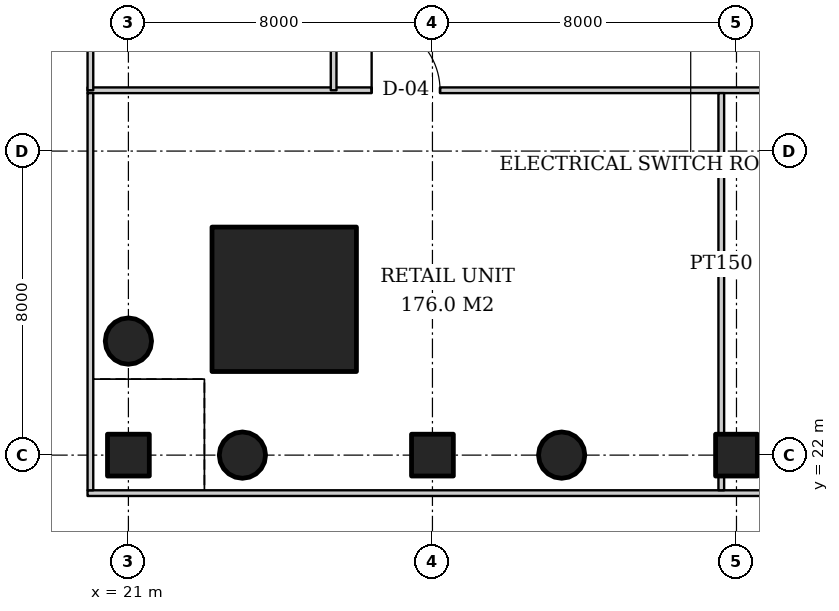
"""IFC4 building model, lengths in metres.
Left out: names, types, materials, properties, quantities, classifications, styles, units other than length and angle.
Written with IfcOpenShell. Run it as: python <this file> out.ifc"""

import sys

from ifc_helpers import new_model, si_unit, direction, frame, frame_2d, origin, origin_2d, place, context, subcontext, project, spatial, rectangle, hollow_circle, extrude, element, fill, save


model = new_model("IFC4")
c1 = context("Model", 3, precision=1e-05, world=origin(), true_north=direction((0.0, 1.0)))
c2 = subcontext(c1, "Body", "Model", "MODEL_VIEW")
j1 = project(units=[si_unit("LENGTHUNIT", "METRE"), si_unit("PLANEANGLEUNIT", "RADIAN")], contexts=[c1])
p1 = place(None, origin())
s1 = spatial("IfcSite", under=j1, at=p1, CompositionType="ELEMENT")
p2 = place(p1, origin())
s2 = spatial("IfcBuilding", under=s1, at=p2, CompositionType="ELEMENT")
p3 = place(p2, frame((0.0, 0.0, 6.0)))
s3 = spatial("IfcBuildingStorey", under=s2, at=p3, CompositionType="ELEMENT", Elevation=6.0)
p4 = place(p3, frame((25.1, 26.1, 0.0), z_axis=(0.0, 0.0, 1.0), x_axis=(1.0, 0.0, 0.0)))
e1 = element("IfcColumn", 1, at=p4, inside=s3, PredefinedType="COLUMN", context=c2, shape_type="SweptSolid", body=[
    extrude(rectangle(XDim=3.8, YDim=3.8, at=origin_2d()), origin(), (0.0, 0.0, 1.0), 5.0),
])
for number, where, z_axis, x_axis in (
    (2, (21.0, 25.0, 0.0), (0.0, 0.0, 1.0), (1.0, 0.0, 0.0)),
    (3, (24.0, 22.0, 0.0), (0.0, 0.0, 1.0), (1.0, 0.0, 0.0)),
    (4, (32.4, 22.0, 0.0), (0.0, 0.0, 1.0), (1.0, 0.0, 0.0)),
):
    element("IfcColumn", number, at=place(p3, frame(where, z_axis=z_axis, x_axis=x_axis)), inside=s3, PredefinedType="COLUMN", context=c2, shape_type="SweptSolid", body=[
        extrude(hollow_circle(Radius=0.61, WallThickness=0.04, at=origin_2d()), origin(), (0.0, 0.0, 1.0), 5.0),
    ])
for number, where, z_axis, x_axis in (
    (5, (21.0, 22.0, 0.0), (0.0, 0.0, 1.0), (1.0, 0.0, 0.0)),
    (6, (29.0, 22.0, 0.0), (0.0, 0.0, 1.0), (1.0, 0.0, 0.0)),
    (7, (37.0, 22.0, 0.0), (0.0, 0.0, 1.0), (1.0, 0.0, 0.0)),
):
    element("IfcColumn", number, at=place(p3, frame(where, z_axis=z_axis, x_axis=x_axis)), inside=s3, PredefinedType="COLUMN", context=c2, shape_type="SweptSolid", body=[
        extrude(rectangle(XDim=1.1, YDim=1.1, at=origin_2d()), origin(), (0.0, 0.0, 1.0), 5.0),
    ])
p5 = place(p3, frame((19.925, 21.0, 0.0), z_axis=(0.0, 0.0, 1.0), x_axis=(1.0, 0.0, 0.0)))
e8 = element("IfcWall", 8, at=p5, inside=s3, PredefinedType="PARTITIONING", context=c2, shape_type="SweptSolid", body=[
    extrude(rectangle(XDim=50.15, YDim=0.15, at=frame_2d((25.075, 0.0))), origin(), (0.0, 0.0, 1.0), 3.2),
])
p6 = place(p3, frame((19.925, 31.6, 0.0), z_axis=(0.0, 0.0, 1.0), x_axis=(1.0, 0.0, 0.0)))
e9 = element("IfcWall", 9, at=p6, inside=s3, PredefinedType="PARTITIONING", context=c2, shape_type="SweptSolid", body=[
    extrude(rectangle(XDim=50.15, YDim=0.15, at=frame_2d((25.075, 0.0))), origin(), (0.0, 0.0, 1.0), 3.688),
])
p7 = place(p6, frame((7.475, 0.0, 0.0)))
e10 = element("IfcOpeningElement", 10, at=p7, cuts=e9, PredefinedType="OPENING", context=c2, shape_type="SweptSolid", body=[
    extrude(rectangle(XDim=1.8, YDim=2.4, at=frame_2d((0.9, 1.2))), frame((0.0, 0.085, 0.0), z_axis=(0.0, -1.0, 0.0), x_axis=(1.0, 0.0, 0.0)), (0.0, 0.0, 1.0), 0.17),
])
p8 = place(p6, frame((19.975, 0.0, 0.0)))
e11 = element("IfcOpeningElement", 11, at=p8, cuts=e9, PredefinedType="OPENING", context=c2, shape_type="SweptSolid", body=[
    extrude(rectangle(XDim=1.8, YDim=2.4, at=frame_2d((0.9, 1.2))), frame((0.0, 0.085, 0.0), z_axis=(0.0, -1.0, 0.0), x_axis=(1.0, 0.0, 0.0)), (0.0, 0.0, 1.0), 0.17),
])
p9 = place(p6, frame((28.375, 0.0, 0.0)))
e12 = element("IfcOpeningElement", 12, at=p9, cuts=e9, PredefinedType="OPENING", context=c2, shape_type="SweptSolid", body=[
    extrude(rectangle(XDim=1.8, YDim=2.4, at=frame_2d((0.9, 1.2))), frame((0.0, 0.085, 0.0), z_axis=(0.0, -1.0, 0.0), x_axis=(1.0, 0.0, 0.0)), (0.0, 0.0, 1.0), 0.17),
])
p10 = place(p6, frame((40.875, 0.0, 0.0)))
e13 = element("IfcOpeningElement", 13, at=p10, cuts=e9, PredefinedType="OPENING", context=c2, shape_type="SweptSolid", body=[
    extrude(rectangle(XDim=1.8, YDim=2.4, at=frame_2d((0.9, 1.2))), frame((0.0, 0.085, 0.0), z_axis=(0.0, -1.0, 0.0), x_axis=(1.0, 0.0, 0.0)), (0.0, 0.0, 1.0), 0.17),
])
p11 = place(p3, frame((20.0, 21.075, 0.0), z_axis=(0.0, 0.0, 1.0), x_axis=(0.0, 1.0, 0.0)))
e14 = element("IfcWall", 14, at=p11, inside=s3, PredefinedType="PARTITIONING", context=c2, shape_type="SweptSolid", body=[
    extrude(rectangle(XDim=10.45, YDim=0.15, at=frame_2d((5.225, 0.0))), origin(), (0.0, 0.0, 1.0), 3.2),
])
p12 = place(p3, frame((36.6, 21.075, 0.0), z_axis=(0.0, 0.0, 1.0), x_axis=(0.0, 1.0, 0.0)))
e15 = element("IfcWall", 15, at=p12, inside=s3, PredefinedType="PARTITIONING", context=c2, shape_type="SweptSolid", body=[
    extrude(rectangle(XDim=0.375, YDim=0.15, at=frame_2d((0.188, 0.0))), origin(), (0.0, 0.0, 1.0), 3.2),
])
p13 = place(p3, frame((36.6, 22.55, 0.0), z_axis=(0.0, 0.0, 1.0), x_axis=(0.0, 1.0, 0.0)))
e16 = element("IfcWall", 16, at=p13, inside=s3, PredefinedType="PARTITIONING", context=c2, shape_type="SweptSolid", body=[
    extrude(rectangle(XDim=8.975, YDim=0.15, at=frame_2d((4.487, 0.0))), origin(), (0.0, 0.0, 1.0), 4.7),
])
p14 = place(p3, frame((20.0, 31.6, 0.0), z_axis=(0.0, 0.0, 1.0), x_axis=(0.0, 1.0, 0.0)))
e17 = element("IfcWall", 17, at=p14, inside=s3, PredefinedType="PARTITIONING", context=c2, shape_type="SweptSolid", body=[
    extrude(rectangle(XDim=28.8, YDim=0.15, at=frame_2d((14.4, 0.0))), origin(), (0.0, 0.0, 1.0), 3.2),
])
p15 = place(p3, frame((26.4, 31.6, 0.0), z_axis=(0.0, 0.0, 1.0), x_axis=(0.0, 1.0, 0.0)))
e18 = element("IfcWall", 18, at=p15, inside=s3, PredefinedType="PARTITIONING", context=c2, shape_type="SweptSolid", body=[
    extrude(rectangle(XDim=28.8, YDim=0.15, at=frame_2d((14.4, 0.0))), origin(), (0.0, 0.0, 1.0), 3.688),
])
p16 = place(p15, frame((6.45, 0.0, 0.0)))
e19 = element("IfcOpeningElement", 19, at=p16, cuts=e18, PredefinedType="OPENING", context=c2, shape_type="SweptSolid", body=[
    extrude(rectangle(XDim=1.5, YDim=2.1, at=frame_2d((0.75, 1.05))), frame((0.0, 0.085, 0.0), z_axis=(0.0, -1.0, 0.0), x_axis=(1.0, 0.0, 0.0)), (0.0, 0.0, 1.0), 0.17),
])
p17 = place(p15, frame((20.7, 0.0, 0.0)))
e20 = element("IfcOpeningElement", 20, at=p17, cuts=e18, PredefinedType="OPENING", context=c2, shape_type="SweptSolid", body=[
    extrude(rectangle(XDim=1.8, YDim=2.4, at=frame_2d((0.9, 1.2))), frame((0.0, 0.085, 0.0), z_axis=(0.0, -1.0, 0.0), x_axis=(1.0, 0.0, 0.0)), (0.0, 0.0, 1.0), 0.17),
])
p18 = place(p7, origin())
e21 = element("IfcDoor", 21, at=p18, inside=s3, OperationType="DOUBLE_DOOR_SINGLE_SWING", PredefinedType="DOOR", context=c2, shape_type="SweptSolid", body=[
    extrude(rectangle(XDim=1.8, YDim=2.4, at=frame_2d((0.9, 1.2))), frame((0.0, 0.025, 0.0), z_axis=(0.0, -1.0, 0.0), x_axis=(1.0, 0.0, 0.0)), (0.0, 0.0, 1.0), 0.05),
])
fill(e10, e21)
save(model, sys.argv[1])
